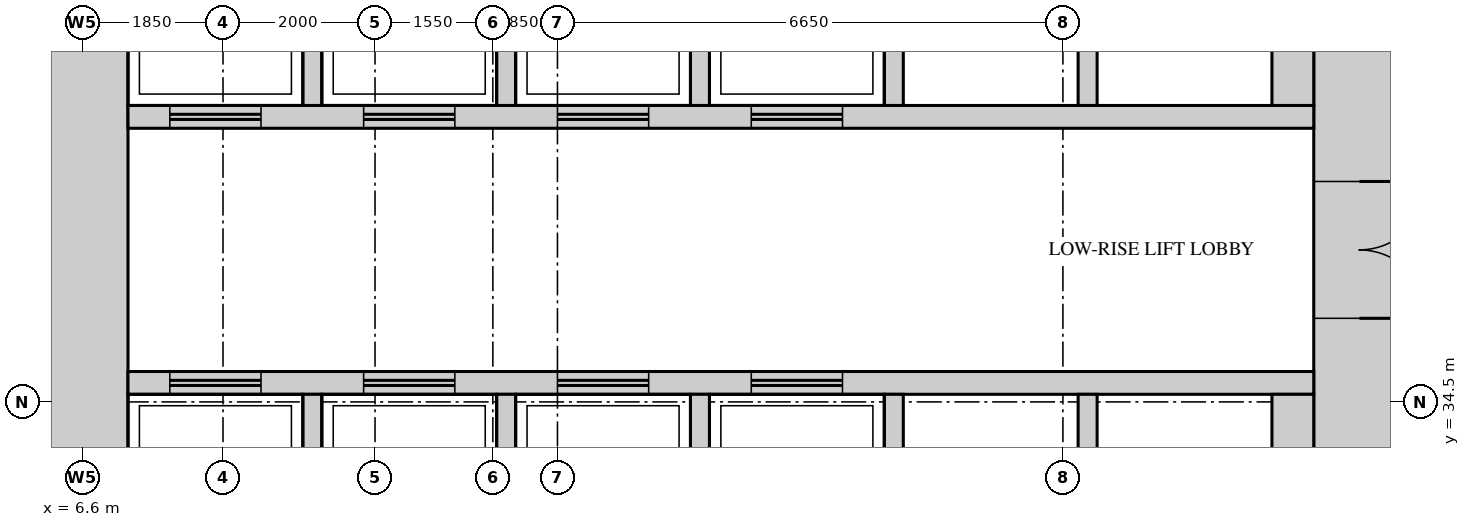
"""IFC4 building model, lengths in metres.
Left out: names, types, materials, properties, quantities, classifications, styles, units other than length and angle.
Written with IfcOpenShell. Run it as: python <this file> out.ifc"""

import sys

from ifc_helpers import new_model, si_unit, direction, frame, frame_2d, origin, place, context, subcontext, project, spatial, rectangle, extrude, source, transform, mapped, element, fill, save


model = new_model("IFC4")
c1 = context("Model", 3, precision=1e-05, world=origin(), true_north=direction((0.0, 1.0)))
c2 = subcontext(c1, "Body", "Model", "MODEL_VIEW")
j1 = project(units=[si_unit("LENGTHUNIT", "METRE"), si_unit("PLANEANGLEUNIT", "RADIAN")], contexts=[c1])
p1 = place(None, origin())
s1 = spatial("IfcSite", under=j1, at=p1, CompositionType="ELEMENT")
p2 = place(p1, origin())
s2 = spatial("IfcBuilding", under=s1, at=p2, CompositionType="ELEMENT")
p3 = place(p2, frame((0.0, 0.0, 55.5)))
s3 = spatial("IfcBuildingStorey", under=s2, at=p3, CompositionType="ELEMENT", Elevation=55.5)
m1 = source(origin(), c2, "Body", "SweptSolid", [
    extrude(rectangle(XDim=27.6, YDim=1.2, at=frame_2d((13.8, 0.0))), origin(), (0.0, 0.0, 1.0), 4.2),
])
p4 = place(p3, frame((23.4, 13.2, 0.0), z_axis=(0.0, 0.0, 1.0), x_axis=(0.0, 1.0, 0.0)))
e1 = element("IfcWall", 1, at=p4, inside=s3, PredefinedType="SHEAR", context=c2, shape_type="MappedRepresentation", body=[
    mapped(m1, transform((0.0, 0.0, 0.0))),
])
m2 = source(origin(), c2, "Body", "SweptSolid", [
    extrude(rectangle(XDim=1.8, YDim=2.1, at=frame_2d((0.9, 1.05))), frame((0.0, 0.61, 0.0), z_axis=(0.0, -1.0, 0.0), x_axis=(1.0, 0.0, 0.0)), (0.0, 0.0, 1.0), 1.22),
])
p5 = place(p4, frame((22.4, 0.0, 0.0)))
e2 = element("IfcOpeningElement", 2, at=p5, cuts=e1, PredefinedType="OPENING", context=c2, shape_type="MappedRepresentation", body=[
    mapped(m2, transform((0.0, 0.0, 0.0))),
])
m3 = source(origin(), c2, "Body", "SweptSolid", [
    extrude(rectangle(XDim=1.2, YDim=2.1, at=frame_2d((0.6, 1.05))), frame((0.0, 0.61, 0.0), z_axis=(0.0, -1.0, 0.0), x_axis=(1.0, 0.0, 0.0)), (0.0, 0.0, 1.0), 1.22),
])
p6 = place(p4, frame((15.15, 0.0, 0.0)))
e3 = element("IfcOpeningElement", 3, at=p6, cuts=e1, PredefinedType="OPENING", context=c2, shape_type="MappedRepresentation", body=[
    mapped(m3, transform((0.0, 0.0, 0.0))),
])
m4 = source(origin(), c2, "Body", "SweptSolid", [
    extrude(rectangle(XDim=0.9, YDim=2.1, at=frame_2d((0.45, 1.05))), frame((0.0, 0.61, 0.0), z_axis=(0.0, -1.0, 0.0), x_axis=(1.0, 0.0, 0.0)), (0.0, 0.0, 1.0), 1.22),
])
p7 = place(p4, frame((1.15, 0.0, 0.0)))
e4 = element("IfcOpeningElement", 4, at=p7, cuts=e1, PredefinedType="OPENING", context=c2, shape_type="MappedRepresentation", body=[
    mapped(m4, transform((0.0, 0.0, 0.0))),
])
p8 = place(p4, frame((4.35, 0.0, 0.0)))
e5 = element("IfcOpeningElement", 5, at=p8, cuts=e1, PredefinedType="OPENING", context=c2, shape_type="MappedRepresentation", body=[
    mapped(m4, transform((0.0, 0.0, 0.0))),
])
p9 = place(p4, frame((7.6, 0.0, 0.0)))
e6 = element("IfcOpeningElement", 6, at=p9, cuts=e1, PredefinedType="OPENING", context=c2, shape_type="MappedRepresentation", body=[
    mapped(m4, transform((0.0, 0.0, 0.0))),
])
p10 = place(p3, frame((6.6, 13.2, 0.0), z_axis=(0.0, 0.0, 1.0), x_axis=(0.0, 1.0, 0.0)))
e7 = element("IfcWall", 7, at=p10, inside=s3, PredefinedType="SHEAR", context=c2, shape_type="MappedRepresentation", body=[
    mapped(m1, transform((0.0, 0.0, 0.0))),
])
m5 = source(origin(), c2, "Body", "SweptSolid", [
    extrude(rectangle(XDim=15.6, YDim=0.3, at=frame_2d((7.8, 0.0))), origin(), (0.0, 0.0, 1.0), 4.2),
])
p11 = place(p3, frame((7.2, 38.25, 0.0), z_axis=(0.0, 0.0, 1.0), x_axis=(1.0, 0.0, 0.0)))
e8 = element("IfcWall", 8, at=p11, inside=s3, PredefinedType="STANDARD", context=c2, shape_type="MappedRepresentation", body=[
    mapped(m5, transform((0.0, 0.0, 0.0))),
])
m6 = source(origin(), c2, "Body", "SweptSolid", [
    extrude(rectangle(XDim=1.2, YDim=2.1, at=frame_2d((0.6, 1.05))), frame((0.0, 0.16, 0.0), z_axis=(0.0, -1.0, 0.0), x_axis=(1.0, 0.0, 0.0)), (0.0, 0.0, 1.0), 0.32),
])
p12 = place(p11, frame((0.55, 0.0, 0.0)))
e9 = element("IfcOpeningElement", 9, at=p12, cuts=e8, PredefinedType="OPENING", context=c2, shape_type="MappedRepresentation", body=[
    mapped(m6, transform((0.0, 0.0, 0.0))),
])
p13 = place(p11, frame((3.1, 0.0, 0.0)))
e10 = element("IfcOpeningElement", 10, at=p13, cuts=e8, PredefinedType="OPENING", context=c2, shape_type="MappedRepresentation", body=[
    mapped(m6, transform((0.0, 0.0, 0.0))),
])
p14 = place(p11, frame((5.65, 0.0, 0.0)))
e11 = element("IfcOpeningElement", 11, at=p14, cuts=e8, PredefinedType="OPENING", context=c2, shape_type="MappedRepresentation", body=[
    mapped(m6, transform((0.0, 0.0, 0.0))),
])
p15 = place(p11, frame((8.2, 0.0, 0.0)))
e12 = element("IfcOpeningElement", 12, at=p15, cuts=e8, PredefinedType="OPENING", context=c2, shape_type="MappedRepresentation", body=[
    mapped(m6, transform((0.0, 0.0, 0.0))),
])
p16 = place(p3, frame((7.2, 34.75, 0.0), z_axis=(0.0, 0.0, 1.0), x_axis=(1.0, 0.0, 0.0)))
e13 = element("IfcWall", 13, at=p16, inside=s3, PredefinedType="STANDARD", context=c2, shape_type="MappedRepresentation", body=[
    mapped(m5, transform((0.0, 0.0, 0.0))),
])
p17 = place(p16, frame((0.55, 0.0, 0.0)))
e14 = element("IfcOpeningElement", 14, at=p17, cuts=e13, PredefinedType="OPENING", context=c2, shape_type="MappedRepresentation", body=[
    mapped(m6, transform((0.0, 0.0, 0.0))),
])
p18 = place(p16, frame((3.1, 0.0, 0.0)))
e15 = element("IfcOpeningElement", 15, at=p18, cuts=e13, PredefinedType="OPENING", context=c2, shape_type="MappedRepresentation", body=[
    mapped(m6, transform((0.0, 0.0, 0.0))),
])
p19 = place(p16, frame((5.65, 0.0, 0.0)))
e16 = element("IfcOpeningElement", 16, at=p19, cuts=e13, PredefinedType="OPENING", context=c2, shape_type="MappedRepresentation", body=[
    mapped(m6, transform((0.0, 0.0, 0.0))),
])
p20 = place(p16, frame((8.2, 0.0, 0.0)))
e17 = element("IfcOpeningElement", 17, at=p20, cuts=e13, PredefinedType="OPENING", context=c2, shape_type="MappedRepresentation", body=[
    mapped(m6, transform((0.0, 0.0, 0.0))),
])
m7 = source(origin(), c2, "Body", "SweptSolid", [
    extrude(rectangle(XDim=2.4, YDim=0.25, at=frame_2d((1.2, 0.0))), origin(), (0.0, 0.0, 1.0), 4.2),
])
for number, where, z_axis, x_axis in (
    (18, (9.625, 38.4, 0.0), (0.0, 0.0, 1.0), (0.0, 1.0, 0.0)),
    (19, (12.175, 38.4, 0.0), (0.0, 0.0, 1.0), (0.0, 1.0, 0.0)),
    (20, (14.725, 38.4, 0.0), (0.0, 0.0, 1.0), (0.0, 1.0, 0.0)),
    (21, (17.275, 38.4, 0.0), (0.0, 0.0, 1.0), (0.0, 1.0, 0.0)),
    (22, (19.825, 38.4, 0.0), (0.0, 0.0, 1.0), (0.0, 1.0, 0.0)),
):
    element("IfcWall", number, at=place(p3, frame(where, z_axis=z_axis, x_axis=x_axis)), inside=s3, PredefinedType="STANDARD", context=c2, shape_type="MappedRepresentation", body=[
        mapped(m7, transform((0.0, 0.0, 0.0))),
    ])
m8 = source(origin(), c2, "Body", "SweptSolid", [
    extrude(rectangle(XDim=2.4, YDim=0.55, at=frame_2d((1.2, 0.0))), origin(), (0.0, 0.0, 1.0), 4.2),
])
p21 = place(p3, frame((22.525, 38.4, 0.0), z_axis=(0.0, 0.0, 1.0), x_axis=(0.0, 1.0, 0.0)))
e23 = element("IfcWall", 23, at=p21, inside=s3, PredefinedType="STANDARD", context=c2, shape_type="MappedRepresentation", body=[
    mapped(m8, transform((0.0, 0.0, 0.0))),
])
for number, where, z_axis, x_axis in (
    (24, (9.625, 32.2, 0.0), (0.0, 0.0, 1.0), (0.0, 1.0, 0.0)),
    (25, (12.175, 32.2, 0.0), (0.0, 0.0, 1.0), (0.0, 1.0, 0.0)),
    (26, (14.725, 32.2, 0.0), (0.0, 0.0, 1.0), (0.0, 1.0, 0.0)),
    (27, (17.275, 32.2, 0.0), (0.0, 0.0, 1.0), (0.0, 1.0, 0.0)),
    (28, (19.825, 32.2, 0.0), (0.0, 0.0, 1.0), (0.0, 1.0, 0.0)),
):
    element("IfcWall", number, at=place(p3, frame(where, z_axis=z_axis, x_axis=x_axis)), inside=s3, PredefinedType="STANDARD", context=c2, shape_type="MappedRepresentation", body=[
        mapped(m7, transform((0.0, 0.0, 0.0))),
    ])
p22 = place(p3, frame((22.525, 32.2, 0.0), z_axis=(0.0, 0.0, 1.0), x_axis=(0.0, 1.0, 0.0)))
e29 = element("IfcWall", 29, at=p22, inside=s3, PredefinedType="STANDARD", context=c2, shape_type="MappedRepresentation", body=[
    mapped(m8, transform((0.0, 0.0, 0.0))),
])
m9 = source(origin(), c2, "Body", "SweptSolid", [
    extrude(rectangle(XDim=1.8, YDim=2.1, at=frame_2d((0.9, 1.05))), frame((0.0, 0.55, 0.0), z_axis=(0.0, -1.0, 0.0), x_axis=(1.0, 0.0, 0.0)), (0.0, 0.0, 1.0), 1.1),
])
p23 = place(p5, origin())
e30 = element("IfcDoor", 30, at=p23, inside=s3, OperationType="DOUBLE_DOOR_SINGLE_SWING", PredefinedType="DOOR", context=c2, shape_type="MappedRepresentation", body=[
    mapped(m9, transform((0.0, 0.0, 0.0))),
])
fill(e2, e30)
m10 = source(origin(), c2, "Body", "SweptSolid", [
    extrude(rectangle(XDim=1.2, YDim=2.1, at=frame_2d((0.6, 1.05))), frame((0.0, 0.025, 0.0), z_axis=(0.0, -1.0, 0.0), x_axis=(1.0, 0.0, 0.0)), (0.0, 0.0, 1.0), 0.05),
])
p24 = place(p17, origin())
e31 = element("IfcDoor", 31, at=p24, inside=s3, OperationType="DOUBLE_DOOR_SLIDING", PredefinedType="DOOR", context=c2, shape_type="MappedRepresentation", body=[
    mapped(m10, transform((0.0, 0.0, 0.0))),
])
fill(e14, e31)
p25 = place(p18, origin())
e32 = element("IfcDoor", 32, at=p25, inside=s3, OperationType="DOUBLE_DOOR_SLIDING", PredefinedType="DOOR", context=c2, shape_type="MappedRepresentation", body=[
    mapped(m10, transform((0.0, 0.0, 0.0))),
])
fill(e15, e32)
p26 = place(p19, origin())
e33 = element("IfcDoor", 33, at=p26, inside=s3, OperationType="DOUBLE_DOOR_SLIDING", PredefinedType="DOOR", context=c2, shape_type="MappedRepresentation", body=[
    mapped(m10, transform((0.0, 0.0, 0.0))),
])
fill(e16, e33)
p27 = place(p20, origin())
e34 = element("IfcDoor", 34, at=p27, inside=s3, OperationType="DOUBLE_DOOR_SLIDING", PredefinedType="DOOR", context=c2, shape_type="MappedRepresentation", body=[
    mapped(m10, transform((0.0, 0.0, 0.0))),
])
fill(e17, e34)
p28 = place(p12, origin())
e35 = element("IfcDoor", 35, at=p28, inside=s3, OperationType="DOUBLE_DOOR_SLIDING", PredefinedType="DOOR", context=c2, shape_type="MappedRepresentation", body=[
    mapped(m10, transform((0.0, 0.0, 0.0))),
])
fill(e9, e35)
p29 = place(p13, origin())
e36 = element("IfcDoor", 36, at=p29, inside=s3, OperationType="DOUBLE_DOOR_SLIDING", PredefinedType="DOOR", context=c2, shape_type="MappedRepresentation", body=[
    mapped(m10, transform((0.0, 0.0, 0.0))),
])
fill(e10, e36)
p30 = place(p14, origin())
e37 = element("IfcDoor", 37, at=p30, inside=s3, OperationType="DOUBLE_DOOR_SLIDING", PredefinedType="DOOR", context=c2, shape_type="MappedRepresentation", body=[
    mapped(m10, transform((0.0, 0.0, 0.0))),
])
fill(e11, e37)
p31 = place(p15, origin())
e38 = element("IfcDoor", 38, at=p31, inside=s3, OperationType="DOUBLE_DOOR_SLIDING", PredefinedType="DOOR", context=c2, shape_type="MappedRepresentation", body=[
    mapped(m10, transform((0.0, 0.0, 0.0))),
])
fill(e12, e38)
save(model, sys.argv[1])
